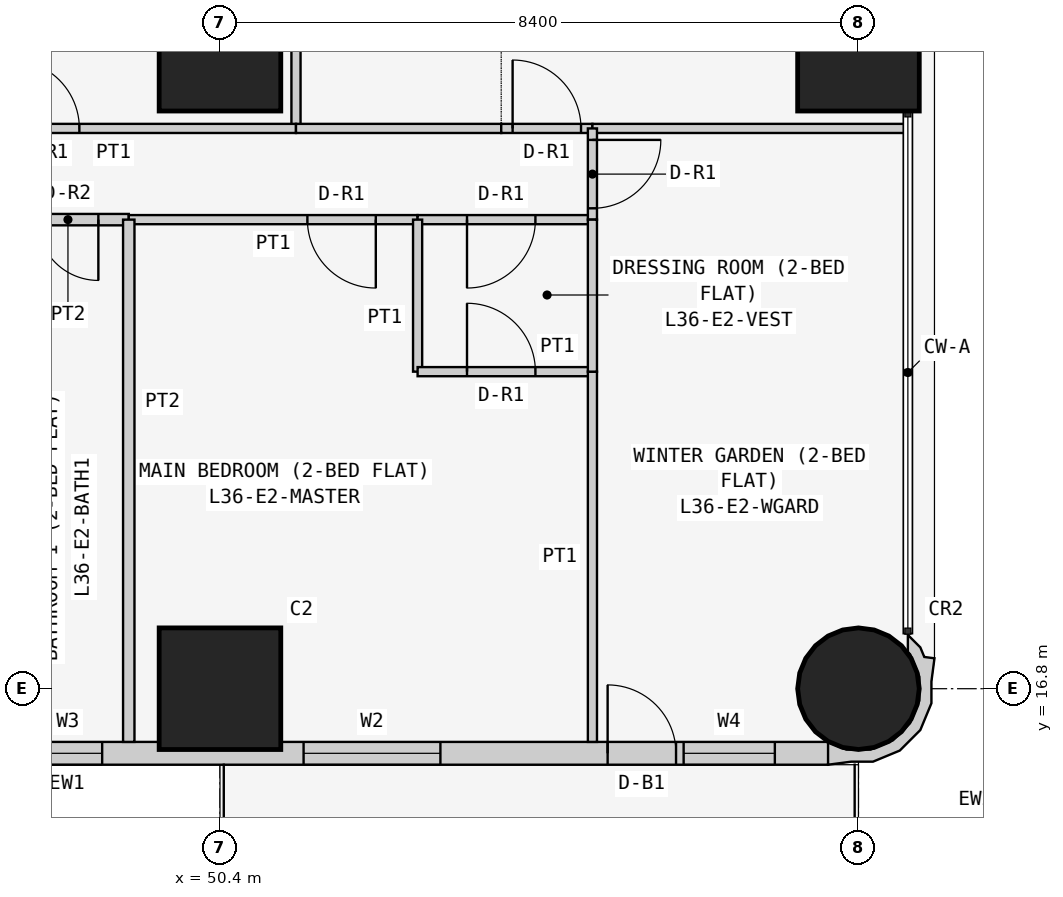
"""IFC4 building model, lengths in metres.
Left out: names, types, materials, properties, quantities, classifications, styles, units other than length and angle.
Written with IfcOpenShell. Run it as: python <this file> out.ifc"""

import sys

from ifc_helpers import new_model, si_unit, direction, frame, frame_2d, origin, origin_2d, place, context, subcontext, project, spatial, polyline, rectangle, circle, outline, extrude, element, fill, save


model = new_model("IFC4")
c1 = context("Model", 3, precision=1e-05, world=origin(), true_north=direction((0.0, 1.0)))
c2 = subcontext(c1, "Body", "Model", "MODEL_VIEW")
j1 = project(units=[si_unit("LENGTHUNIT", "METRE"), si_unit("PLANEANGLEUNIT", "RADIAN")], contexts=[c1])
p1 = place(None, origin())
s1 = spatial("IfcSite", under=j1, at=p1, CompositionType="ELEMENT")
p2 = place(p1, origin())
s2 = spatial("IfcBuilding", under=s1, at=p2, CompositionType="ELEMENT")
p3 = place(p2, frame((0.0, 0.0, 141.3)))
s3 = spatial("IfcBuildingStorey", under=s2, at=p3, CompositionType="ELEMENT", Elevation=141.3)
for number, where, z_axis, x_axis in (
    (1, (50.4, 16.8, 0.0), (0.0, 0.0, 1.0), (1.0, 0.0, 0.0)),
    (2, (50.4, 25.2, 0.0), (0.0, 0.0, 1.0), (1.0, 0.0, 0.0)),
):
    element("IfcColumn", number, at=place(p3, frame(where, z_axis=z_axis, x_axis=x_axis)), inside=s3, PredefinedType="COLUMN", context=c2, shape_type="SweptSolid", body=[
        extrude(rectangle(XDim=1.6, YDim=1.6, at=origin_2d()), origin(), (0.0, 0.0, 1.0), 3.6),
    ])
p4 = place(p3, frame((58.8, 16.8, 0.0), z_axis=(0.0, 0.0, 1.0), x_axis=(1.0, 0.0, 0.0)))
e3 = element("IfcColumn", 3, at=p4, inside=s3, PredefinedType="COLUMN", context=c2, shape_type="SweptSolid", body=[
    extrude(circle(Radius=0.8, at=origin_2d()), origin(), (0.0, 0.0, 1.0), 3.6),
])
p5 = place(p3, frame((58.8, 25.2, 0.0), z_axis=(0.0, 0.0, 1.0), x_axis=(1.0, 0.0, 0.0)))
e4 = element("IfcColumn", 4, at=p5, inside=s3, PredefinedType="COLUMN", context=c2, shape_type="SweptSolid", body=[
    extrude(rectangle(XDim=1.6, YDim=1.6, at=origin_2d()), origin(), (0.0, 0.0, 1.0), 3.6),
])
p6 = place(p3, frame((43.0, 15.95, 0.0), z_axis=(0.0, 0.0, 1.0), x_axis=(1.0, 0.0, 0.0)))
e5 = element("IfcWall", 5, at=p6, inside=s3, PredefinedType="SOLIDWALL", context=c2, shape_type="SweptSolid", body=[
    extrude(rectangle(XDim=15.4, YDim=0.3, at=frame_2d((7.7, 0.0))), origin(), (0.0, 0.0, 1.0), 3.45),
])
p7 = place(p6, frame((1.2, 0.0, 0.9)))
e6 = element("IfcOpeningElement", 6, at=p7, cuts=e5, PredefinedType="OPENING", context=c2, shape_type="SweptSolid", body=[
    extrude(rectangle(XDim=1.8, YDim=1.5, at=frame_2d((0.9, 0.75))), frame((0.0, 0.16, 0.0), z_axis=(0.0, -1.0, 0.0), x_axis=(1.0, 0.0, 0.0)), (0.0, 0.0, 1.0), 0.32),
])
p8 = place(p6, frame((4.95, 0.0, 1.5)))
e7 = element("IfcOpeningElement", 7, at=p8, cuts=e5, PredefinedType="OPENING", context=c2, shape_type="SweptSolid", body=[
    extrude(rectangle(XDim=0.9, YDim=0.7, at=frame_2d((0.45, 0.35))), frame((0.0, 0.16, 0.0), z_axis=(0.0, -1.0, 0.0), x_axis=(1.0, 0.0, 0.0)), (0.0, 0.0, 1.0), 0.32),
])
p9 = place(p6, frame((8.5, 0.0, 0.9)))
e8 = element("IfcOpeningElement", 8, at=p9, cuts=e5, PredefinedType="OPENING", context=c2, shape_type="SweptSolid", body=[
    extrude(rectangle(XDim=1.8, YDim=1.5, at=frame_2d((0.9, 0.75))), frame((0.0, 0.16, 0.0), z_axis=(0.0, -1.0, 0.0), x_axis=(1.0, 0.0, 0.0)), (0.0, 0.0, 1.0), 0.32),
])
p10 = place(p6, frame((12.5, 0.0, 0.0)))
e9 = element("IfcOpeningElement", 9, at=p10, cuts=e5, PredefinedType="OPENING", context=c2, shape_type="SweptSolid", body=[
    extrude(rectangle(XDim=0.9, YDim=2.4, at=frame_2d((0.45, 1.2))), frame((0.0, 0.16, 0.0), z_axis=(0.0, -1.0, 0.0), x_axis=(1.0, 0.0, 0.0)), (0.0, 0.0, 1.0), 0.32),
])
p11 = place(p6, frame((13.5, 0.0, 0.9)))
e10 = element("IfcOpeningElement", 10, at=p11, cuts=e5, PredefinedType="OPENING", context=c2, shape_type="SweptSolid", body=[
    extrude(rectangle(XDim=1.2, YDim=1.5, at=frame_2d((0.6, 0.75))), frame((0.0, 0.16, 0.0), z_axis=(0.0, -1.0, 0.0), x_axis=(1.0, 0.0, 0.0)), (0.0, 0.0, 1.0), 0.32),
])
p12 = place(p3, frame((58.473, 15.983, 0.0), z_axis=(0.0, 0.0, 1.0), x_axis=(0.93923434088, -0.343276641956, 0.0)))
e11 = element("IfcWall", 11, at=p12, inside=s3, PredefinedType="SOLIDWALL", context=c2, shape_type="SweptSolid", body=[
    extrude(outline(polyline([(0.828, 1.599), (0.697, 1.569), (0.604, 1.67), (0.394, 1.767), (0.471, 1.556), (0.508, 1.539), (0.724, 1.304), (0.834, 1.005), (0.82, 0.686), (0.686, 0.397), (0.451, 0.182), (0.152, 0.073), (-0.116, 0.084), (-0.127, 0.078), (-0.146, 0.071), (-0.006, -0.197), (0.266, -0.055), (0.535, 0.044), (0.817, 0.302), (0.978, 0.648), (0.994, 1.03), (0.895, 1.3), (0.828, 1.599)])), origin(), (0.0, 0.0, 1.0), 3.45),
])
p13 = place(p3, frame((51.4, 29.4, 0.0), z_axis=(0.0, 0.0, 1.0), x_axis=(0.0, -1.0, 0.0)))
e12 = element("IfcWall", 12, at=p13, inside=s3, PredefinedType="PARTITIONING", context=c2, shape_type="SweptSolid", body=[
    extrude(rectangle(XDim=5.229, YDim=0.12, at=frame_2d((2.615, 0.0))), origin(), (0.0, 0.0, 1.0), 3.45),
])
p14 = place(p3, frame((51.4, 24.171, 0.0), z_axis=(0.0, 0.0, 1.0), x_axis=(-1.0, 0.0, 0.0)))
e13 = element("IfcWall", 13, at=p14, inside=s3, PredefinedType="PARTITIONING", context=c2, shape_type="SweptSolid", body=[
    extrude(rectangle(XDim=4.8, YDim=0.12, at=frame_2d((2.4, 0.0))), origin(), (0.0, 0.0, 1.0), 3.45),
])
p15 = place(p14, frame((2.85, 0.0, 0.0)))
e14 = element("IfcOpeningElement", 14, at=p15, cuts=e13, PredefinedType="OPENING", context=c2, shape_type="SweptSolid", body=[
    extrude(rectangle(XDim=0.9, YDim=2.1, at=frame_2d((0.45, 1.05))), frame((0.0, 0.07, 0.0), z_axis=(0.0, -1.0, 0.0), x_axis=(1.0, 0.0, 0.0)), (0.0, 0.0, 1.0), 0.14),
])
p16 = place(p3, frame((54.1, 24.171, 0.0), z_axis=(0.0, 0.0, 1.0), x_axis=(-1.0, 0.0, 0.0)))
e15 = element("IfcWall", 15, at=p16, inside=s3, PredefinedType="PARTITIONING", context=c2, shape_type="SweptSolid", body=[
    extrude(rectangle(XDim=2.7, YDim=0.12, at=frame_2d((1.35, 0.0))), origin(), (0.0, 0.0, 1.0), 3.45),
])
p17 = place(p3, frame((55.3, 24.171, 0.0), z_axis=(0.0, 0.0, 1.0), x_axis=(-1.0, 0.0, 0.0)))
e16 = element("IfcWall", 16, at=p17, inside=s3, PredefinedType="PARTITIONING", context=c2, shape_type="SweptSolid", body=[
    extrude(rectangle(XDim=1.2, YDim=0.12, at=frame_2d((0.6, 0.0))), origin(), (0.0, 0.0, 1.0), 3.45),
])
p18 = place(p17, frame((0.15, 0.0, 0.0)))
e17 = element("IfcOpeningElement", 17, at=p18, cuts=e16, PredefinedType="OPENING", context=c2, shape_type="SweptSolid", body=[
    extrude(rectangle(XDim=0.9, YDim=2.1, at=frame_2d((0.45, 1.05))), frame((0.0, 0.07, 0.0), z_axis=(0.0, -1.0, 0.0), x_axis=(1.0, 0.0, 0.0)), (0.0, 0.0, 1.0), 0.14),
])
p19 = place(p3, frame((59.45, 24.171, 0.0), z_axis=(0.0, 0.0, 1.0), x_axis=(-1.0, 0.0, 0.0)))
e18 = element("IfcWall", 18, at=p19, inside=s3, PredefinedType="PARTITIONING", context=c2, shape_type="SweptSolid", body=[
    extrude(rectangle(XDim=4.15, YDim=0.12, at=frame_2d((2.075, 0.0))), origin(), (0.0, 0.0, 1.0), 3.45),
])
p20 = place(p3, frame((49.2, 22.971, 0.0), z_axis=(0.0, 0.0, 1.0), x_axis=(-1.0, 0.0, 0.0)))
e19 = element("IfcWall", 19, at=p20, inside=s3, PredefinedType="PARTITIONING", context=c2, shape_type="SweptSolid", body=[
    extrude(rectangle(XDim=1.6, YDim=0.15, at=frame_2d((0.8, 0.0))), origin(), (0.0, 0.0, 1.0), 3.45),
])
p21 = place(p20, frame((0.4, 0.0, 0.0)))
e20 = element("IfcOpeningElement", 20, at=p21, cuts=e19, PredefinedType="OPENING", context=c2, shape_type="SweptSolid", body=[
    extrude(rectangle(XDim=0.8, YDim=2.1, at=frame_2d((0.4, 1.05))), frame((0.0, 0.085, 0.0), z_axis=(0.0, -1.0, 0.0), x_axis=(1.0, 0.0, 0.0)), (0.0, 0.0, 1.0), 0.17),
])
p22 = place(p3, frame((53.0, 22.971, 0.0), z_axis=(0.0, 0.0, 1.0), x_axis=(-1.0, 0.0, 0.0)))
e21 = element("IfcWall", 21, at=p22, inside=s3, PredefinedType="PARTITIONING", context=c2, shape_type="SweptSolid", body=[
    extrude(rectangle(XDim=3.8, YDim=0.12, at=frame_2d((1.9, 0.0))), origin(), (0.0, 0.0, 1.0), 3.45),
])
p23 = place(p22, frame((0.55, 0.0, 0.0)))
e22 = element("IfcOpeningElement", 22, at=p23, cuts=e21, PredefinedType="OPENING", context=c2, shape_type="SweptSolid", body=[
    extrude(rectangle(XDim=0.9, YDim=2.1, at=frame_2d((0.45, 1.05))), frame((0.0, 0.07, 0.0), z_axis=(0.0, -1.0, 0.0), x_axis=(1.0, 0.0, 0.0)), (0.0, 0.0, 1.0), 0.14),
])
p24 = place(p3, frame((55.3, 22.971, 0.0), z_axis=(0.0, 0.0, 1.0), x_axis=(-1.0, 0.0, 0.0)))
e23 = element("IfcWall", 23, at=p24, inside=s3, PredefinedType="PARTITIONING", context=c2, shape_type="SweptSolid", body=[
    extrude(rectangle(XDim=2.3, YDim=0.12, at=frame_2d((1.15, 0.0))), origin(), (0.0, 0.0, 1.0), 3.45),
])
p25 = place(p24, frame((0.75, 0.0, 0.0)))
e24 = element("IfcOpeningElement", 24, at=p25, cuts=e23, PredefinedType="OPENING", context=c2, shape_type="SweptSolid", body=[
    extrude(rectangle(XDim=0.9, YDim=2.1, at=frame_2d((0.45, 1.05))), frame((0.0, 0.07, 0.0), z_axis=(0.0, -1.0, 0.0), x_axis=(1.0, 0.0, 0.0)), (0.0, 0.0, 1.0), 0.14),
])
p26 = place(p3, frame((55.3, 24.171, 0.0), z_axis=(0.0, 0.0, 1.0), x_axis=(0.0, -1.0, 0.0)))
e25 = element("IfcWall", 25, at=p26, inside=s3, PredefinedType="PARTITIONING", context=c2, shape_type="SweptSolid", body=[
    extrude(rectangle(XDim=1.2, YDim=0.12, at=frame_2d((0.6, 0.0))), origin(), (0.0, 0.0, 1.0), 3.45),
])
p27 = place(p26, frame((0.151, 0.0, 0.0)))
e26 = element("IfcOpeningElement", 26, at=p27, cuts=e25, PredefinedType="OPENING", context=c2, shape_type="SweptSolid", body=[
    extrude(rectangle(XDim=0.9, YDim=2.1, at=frame_2d((0.45, 1.05))), frame((0.0, 0.07, 0.0), z_axis=(0.0, -1.0, 0.0), x_axis=(1.0, 0.0, 0.0)), (0.0, 0.0, 1.0), 0.14),
])
p28 = place(p3, frame((49.2, 22.971, 0.0), z_axis=(0.0, 0.0, 1.0), x_axis=(0.0, -1.0, 0.0)))
e27 = element("IfcWall", 27, at=p28, inside=s3, PredefinedType="PARTITIONING", context=c2, shape_type="SweptSolid", body=[
    extrude(rectangle(XDim=6.871, YDim=0.15, at=frame_2d((3.436, 0.0))), origin(), (0.0, 0.0, 1.0), 3.45),
])
p29 = place(p3, frame((53.0, 22.971, 0.0), z_axis=(0.0, 0.0, 1.0), x_axis=(0.0, -1.0, 0.0)))
e28 = element("IfcWall", 28, at=p29, inside=s3, PredefinedType="PARTITIONING", context=c2, shape_type="SweptSolid", body=[
    extrude(rectangle(XDim=2.0, YDim=0.12, at=frame_2d((1.0, 0.0))), origin(), (0.0, 0.0, 1.0), 3.45),
])
p30 = place(p3, frame((53.0, 20.971, 0.0), z_axis=(0.0, 0.0, 1.0), x_axis=(1.0, 0.0, 0.0)))
e29 = element("IfcWall", 29, at=p30, inside=s3, PredefinedType="PARTITIONING", context=c2, shape_type="SweptSolid", body=[
    extrude(rectangle(XDim=2.3, YDim=0.12, at=frame_2d((1.15, 0.0))), origin(), (0.0, 0.0, 1.0), 3.45),
])
p31 = place(p30, frame((0.65, 0.0, 0.0)))
e30 = element("IfcOpeningElement", 30, at=p31, cuts=e29, PredefinedType="OPENING", context=c2, shape_type="SweptSolid", body=[
    extrude(rectangle(XDim=0.9, YDim=2.1, at=frame_2d((0.45, 1.05))), frame((0.0, 0.07, 0.0), z_axis=(0.0, -1.0, 0.0), x_axis=(1.0, 0.0, 0.0)), (0.0, 0.0, 1.0), 0.14),
])
p32 = place(p3, frame((55.3, 20.971, 0.0), z_axis=(0.0, 0.0, 1.0), x_axis=(0.0, -1.0, 0.0)))
e31 = element("IfcWall", 31, at=p32, inside=s3, PredefinedType="PARTITIONING", context=c2, shape_type="SweptSolid", body=[
    extrude(rectangle(XDim=4.871, YDim=0.12, at=frame_2d((2.436, 0.0))), origin(), (0.0, 0.0, 1.0), 3.45),
])
p33 = place(p3, frame((55.3, 22.971, 0.0), z_axis=(0.0, 0.0, 1.0), x_axis=(0.0, -1.0, 0.0)))
e32 = element("IfcWall", 32, at=p33, inside=s3, PredefinedType="PARTITIONING", context=c2, shape_type="SweptSolid", body=[
    extrude(rectangle(XDim=2.0, YDim=0.12, at=frame_2d((1.0, 0.0))), origin(), (0.0, 0.0, 1.0), 3.45),
])
p34 = place(p8, origin())
e33 = element("IfcWindow", 33, at=p34, inside=s3, PartitioningType="SINGLE_PANEL", PredefinedType="WINDOW", context=c2, shape_type="SweptSolid", body=[
    extrude(rectangle(XDim=0.9, YDim=0.7, at=frame_2d((0.45, 0.35))), frame((0.0, 0.03, 0.0), z_axis=(0.0, -1.0, 0.0), x_axis=(1.0, 0.0, 0.0)), (0.0, 0.0, 1.0), 0.06),
])
fill(e7, e33)
p35 = place(p9, origin())
e34 = element("IfcWindow", 34, at=p35, inside=s3, PartitioningType="SINGLE_PANEL", PredefinedType="WINDOW", context=c2, shape_type="SweptSolid", body=[
    extrude(rectangle(XDim=1.8, YDim=1.5, at=frame_2d((0.9, 0.75))), frame((0.0, 0.03, 0.0), z_axis=(0.0, -1.0, 0.0), x_axis=(1.0, 0.0, 0.0)), (0.0, 0.0, 1.0), 0.06),
])
fill(e8, e34)
p36 = place(p10, origin())
e35 = element("IfcDoor", 35, at=p36, inside=s3, OperationType="SINGLE_SWING_LEFT", PredefinedType="DOOR", context=c2, shape_type="SweptSolid", body=[
    extrude(rectangle(XDim=0.9, YDim=2.4, at=frame_2d((0.45, 1.2))), frame((0.0, 0.025, 0.0), z_axis=(0.0, -1.0, 0.0), x_axis=(1.0, 0.0, 0.0)), (0.0, 0.0, 1.0), 0.05),
])
fill(e9, e35)
p37 = place(p11, origin())
e36 = element("IfcWindow", 36, at=p37, inside=s3, PartitioningType="SINGLE_PANEL", PredefinedType="WINDOW", context=c2, shape_type="SweptSolid", body=[
    extrude(rectangle(XDim=1.2, YDim=1.5, at=frame_2d((0.6, 0.75))), frame((0.0, 0.03, 0.0), z_axis=(0.0, -1.0, 0.0), x_axis=(1.0, 0.0, 0.0)), (0.0, 0.0, 1.0), 0.06),
])
fill(e10, e36)
p38 = place(p15, frame((0.9, 0.0, 0.0), z_axis=(0.0, 0.0, 1.0), x_axis=(-1.0, 0.0, 0.0)))
e37 = element("IfcDoor", 37, at=p38, inside=s3, OperationType="SINGLE_SWING_LEFT", PredefinedType="DOOR", context=c2, shape_type="SweptSolid", body=[
    extrude(rectangle(XDim=0.9, YDim=2.1, at=frame_2d((0.45, 1.05))), frame((0.0, 0.025, 0.0), z_axis=(0.0, -1.0, 0.0), x_axis=(1.0, 0.0, 0.0)), (0.0, 0.0, 1.0), 0.05),
])
fill(e14, e37)
p39 = place(p18, frame((0.9, 0.0, 0.0), z_axis=(0.0, 0.0, 1.0), x_axis=(-1.0, 0.0, 0.0)))
e38 = element("IfcDoor", 38, at=p39, inside=s3, OperationType="SINGLE_SWING_LEFT", PredefinedType="DOOR", context=c2, shape_type="SweptSolid", body=[
    extrude(rectangle(XDim=0.9, YDim=2.1, at=frame_2d((0.45, 1.05))), frame((0.0, 0.025, 0.0), z_axis=(0.0, -1.0, 0.0), x_axis=(1.0, 0.0, 0.0)), (0.0, 0.0, 1.0), 0.05),
])
fill(e17, e38)
p40 = place(p21, origin())
e39 = element("IfcDoor", 39, at=p40, inside=s3, OperationType="SINGLE_SWING_LEFT", PredefinedType="DOOR", context=c2, shape_type="SweptSolid", body=[
    extrude(rectangle(XDim=0.8, YDim=2.1, at=frame_2d((0.4, 1.05))), frame((0.0, 0.025, 0.0), z_axis=(0.0, -1.0, 0.0), x_axis=(1.0, 0.0, 0.0)), (0.0, 0.0, 1.0), 0.05),
])
fill(e20, e39)
p41 = place(p23, origin())
e40 = element("IfcDoor", 40, at=p41, inside=s3, OperationType="SINGLE_SWING_LEFT", PredefinedType="DOOR", context=c2, shape_type="SweptSolid", body=[
    extrude(rectangle(XDim=0.9, YDim=2.1, at=frame_2d((0.45, 1.05))), frame((0.0, 0.025, 0.0), z_axis=(0.0, -1.0, 0.0), x_axis=(1.0, 0.0, 0.0)), (0.0, 0.0, 1.0), 0.05),
])
fill(e22, e40)
p42 = place(p25, origin())
e41 = element("IfcDoor", 41, at=p42, inside=s3, OperationType="SINGLE_SWING_RIGHT", PredefinedType="DOOR", context=c2, shape_type="SweptSolid", body=[
    extrude(rectangle(XDim=0.9, YDim=2.1, at=frame_2d((0.45, 1.05))), frame((0.0, 0.025, 0.0), z_axis=(0.0, -1.0, 0.0), x_axis=(1.0, 0.0, 0.0)), (0.0, 0.0, 1.0), 0.05),
])
fill(e24, e41)
p43 = place(p31, origin())
e42 = element("IfcDoor", 42, at=p43, inside=s3, OperationType="SINGLE_SWING_LEFT", PredefinedType="DOOR", context=c2, shape_type="SweptSolid", body=[
    extrude(rectangle(XDim=0.9, YDim=2.1, at=frame_2d((0.45, 1.05))), frame((0.0, 0.025, 0.0), z_axis=(0.0, -1.0, 0.0), x_axis=(1.0, 0.0, 0.0)), (0.0, 0.0, 1.0), 0.05),
])
fill(e30, e42)
p44 = place(p27, origin())
e43 = element("IfcDoor", 43, at=p44, inside=s3, OperationType="SINGLE_SWING_LEFT", PredefinedType="DOOR", context=c2, shape_type="SweptSolid", body=[
    extrude(rectangle(XDim=0.9, YDim=2.1, at=frame_2d((0.45, 1.05))), frame((0.0, 0.025, 0.0), z_axis=(0.0, -1.0, 0.0), x_axis=(1.0, 0.0, 0.0)), (0.0, 0.0, 1.0), 0.05),
])
fill(e26, e43)
save(model, sys.argv[1])
